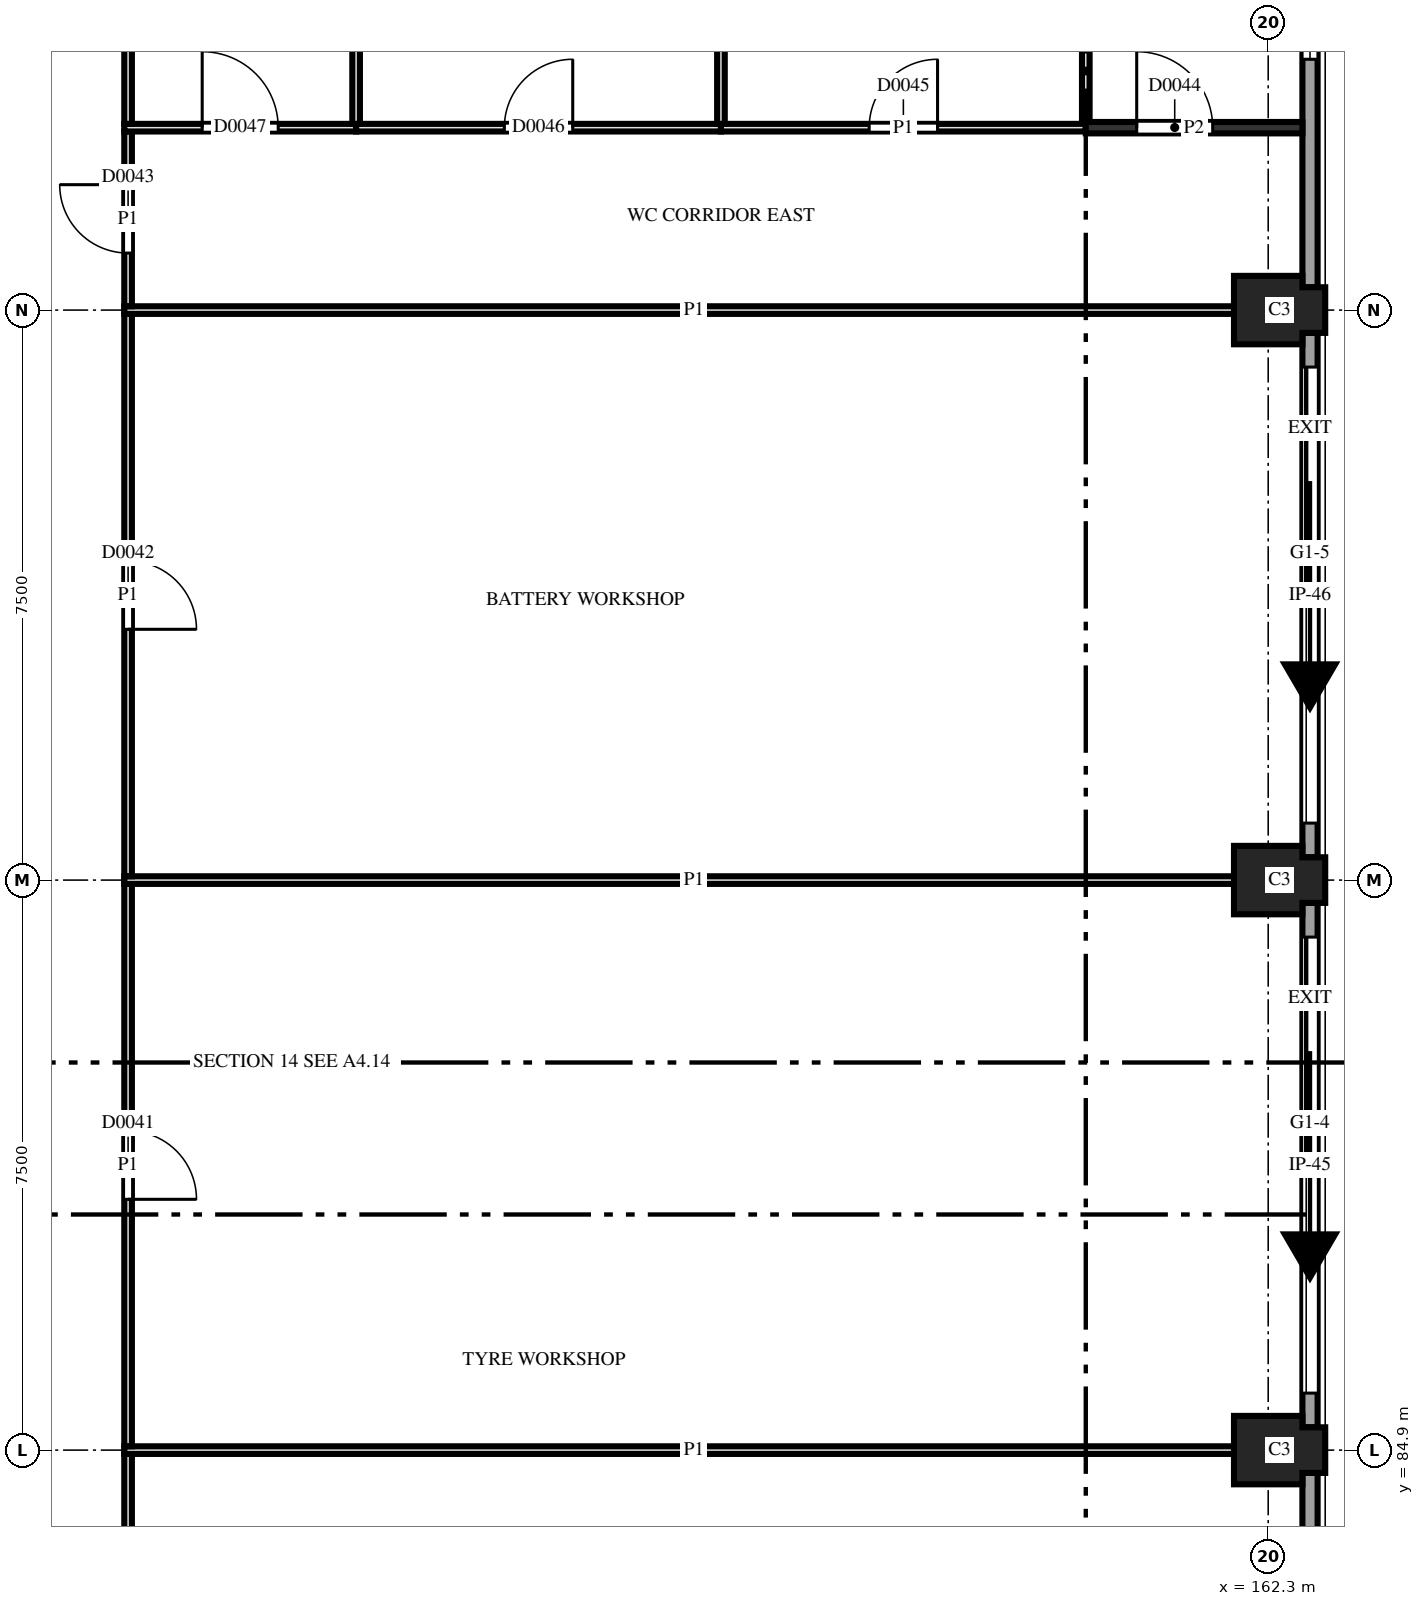
"""IFC4 building model, lengths in metres.
Left out: names, types, materials, properties, quantities, classifications, styles, units other than length and angle.
Written with IfcOpenShell. Run it as: python <this file> out.ifc"""

import sys

from ifc_helpers import new_model, si_unit, direction, frame, frame_2d, origin, place, context, subcontext, project, spatial, polyline, rectangle, outline, extrude, element, fill, save


model = new_model("IFC4")
c1 = context("Model", 3, precision=1e-05, world=origin(), true_north=direction((0.0, 1.0)))
c2 = subcontext(c1, "Body", "Model", "MODEL_VIEW")
j1 = project(units=[si_unit("LENGTHUNIT", "METRE"), si_unit("PLANEANGLEUNIT", "RADIAN")], contexts=[c1])
p1 = place(None, origin())
s1 = spatial("IfcSite", under=j1, at=p1, CompositionType="ELEMENT")
p2 = place(p1, origin())
s2 = spatial("IfcBuilding", under=s1, at=p2, CompositionType="ELEMENT")
p3 = place(p2, origin())
s3 = spatial("IfcBuildingStorey", under=s2, at=p3, CompositionType="ELEMENT", Elevation=0.0)
for number, where, z_axis, x_axis in (
    (1, (162.3, 84.9, 0.0), (0.0, 0.0, 1.0), (1.0, 0.0, 0.0)),
    (2, (162.3, 92.4, 0.0), (0.0, 0.0, 1.0), (1.0, 0.0, 0.0)),
    (3, (162.3, 99.9, 0.0), (0.0, 0.0, 1.0), (1.0, 0.0, 0.0)),
):
    element("IfcColumn", number, at=place(p3, frame(where, z_axis=z_axis, x_axis=x_axis)), inside=s3, PredefinedType="COLUMN", context=c2, shape_type="SweptSolid", body=[
        extrude(outline(polyline([(-0.45, -0.45), (0.45, -0.45), (0.45, -0.3), (0.75, -0.3), (0.75, 0.3), (0.45, 0.3), (0.45, 0.45), (-0.45, 0.45), (-0.45, -0.45)])), origin(), (0.0, 0.0, 1.0), 4.5),
    ])
p4 = place(p3, frame((162.85, 77.7, 0.0), z_axis=(0.0, 0.0, 1.0), x_axis=(0.0, 1.0, 0.0)))
e4 = element("IfcWall", 4, at=p4, inside=s3, PredefinedType="SOLIDWALL", context=c2, shape_type="SweptSolid", body=[
    extrude(outline(polyline([(0.0, 0.0), (6.9, 0.0), (6.9, 3.1), (6.002, 3.1), (6.0, 2.4), (5.681, 2.56), (5.363, 2.695), (5.044, 2.806), (4.725, 2.895), (4.406, 2.963), (4.087, 3.012), (3.769, 3.041), (3.45, 3.05), (3.131, 3.041), (2.812, 3.012), (2.494, 2.963), (2.175, 2.895), (1.856, 2.806), (1.538, 2.695), (1.219, 2.56), (0.9, 2.4), (0.898, 3.1), (0.0, 3.1), (0.0, 0.0)])), frame((0.0, 0.1, 0.0), z_axis=(0.0, -1.0, 0.0), x_axis=(1.0, 0.0, 0.0)), (0.0, 0.0, 1.0), 0.2),
])
p5 = place(p4, frame((3.0, 0.0, 2.4)))
e5 = element("IfcOpeningElement", 5, at=p5, cuts=e4, PredefinedType="OPENING", context=c2, shape_type="SweptSolid", body=[
    extrude(rectangle(XDim=0.9, YDim=0.531, at=frame_2d((0.45, 0.266))), frame((0.0, 0.11, 0.0), z_axis=(0.0, -1.0, 0.0), x_axis=(1.0, 0.0, 0.0)), (0.0, 0.0, 1.0), 0.22),
])
p6 = place(p3, frame((162.85, 85.2, 0.0), z_axis=(0.0, 0.0, 1.0), x_axis=(0.0, 1.0, 0.0)))
e6 = element("IfcWall", 6, at=p6, inside=s3, PredefinedType="SOLIDWALL", context=c2, shape_type="SweptSolid", body=[
    extrude(outline(polyline([(0.0, 0.0), (6.9, 0.0), (6.9, 3.1), (6.752, 3.1), (6.75, 2.8), (6.337, 2.859), (5.925, 2.91), (5.512, 2.953), (5.1, 2.988), (4.688, 3.015), (4.275, 3.034), (3.863, 3.046), (3.45, 3.05), (3.038, 3.046), (2.625, 3.034), (2.212, 3.015), (1.8, 2.988), (1.387, 2.953), (0.975, 2.91), (0.562, 2.859), (0.15, 2.8), (0.148, 3.1), (0.0, 3.1), (0.0, 0.0)])), frame((0.0, 0.1, 0.0), z_axis=(0.0, -1.0, 0.0), x_axis=(1.0, 0.0, 0.0)), (0.0, 0.0, 1.0), 0.2),
])
p7 = place(p6, frame((0.45, 0.0, 0.0)))
e7 = element("IfcOpeningElement", 7, at=p7, cuts=e6, PredefinedType="OPENING", context=c2, shape_type="SweptSolid", body=[
    extrude(rectangle(XDim=6.0, YDim=2.65, at=frame_2d((3.0, 1.325))), frame((0.0, 0.11, 0.0), z_axis=(0.0, -1.0, 0.0), x_axis=(1.0, 0.0, 0.0)), (0.0, 0.0, 1.0), 0.22),
])
p8 = place(p3, frame((162.85, 92.7, 0.0), z_axis=(0.0, 0.0, 1.0), x_axis=(0.0, 1.0, 0.0)))
e8 = element("IfcWall", 8, at=p8, inside=s3, PredefinedType="SOLIDWALL", context=c2, shape_type="SweptSolid", body=[
    extrude(outline(polyline([(0.0, 0.0), (6.9, 0.0), (6.9, 3.1), (6.752, 3.1), (6.75, 2.8), (6.337, 2.859), (5.925, 2.91), (5.512, 2.953), (5.1, 2.988), (4.688, 3.015), (4.275, 3.034), (3.863, 3.046), (3.45, 3.05), (3.038, 3.046), (2.625, 3.034), (2.212, 3.015), (1.8, 2.988), (1.387, 2.953), (0.975, 2.91), (0.562, 2.859), (0.15, 2.8), (0.148, 3.1), (0.0, 3.1), (0.0, 0.0)])), frame((0.0, 0.1, 0.0), z_axis=(0.0, -1.0, 0.0), x_axis=(1.0, 0.0, 0.0)), (0.0, 0.0, 1.0), 0.2),
])
p9 = place(p8, frame((0.45, 0.0, 0.0)))
e9 = element("IfcOpeningElement", 9, at=p9, cuts=e8, PredefinedType="OPENING", context=c2, shape_type="SweptSolid", body=[
    extrude(rectangle(XDim=6.0, YDim=2.65, at=frame_2d((3.0, 1.325))), frame((0.0, 0.11, 0.0), z_axis=(0.0, -1.0, 0.0), x_axis=(1.0, 0.0, 0.0)), (0.0, 0.0, 1.0), 0.22),
])
p10 = place(p3, frame((162.85, 100.2, 0.0), z_axis=(0.0, 0.0, 1.0), x_axis=(0.0, 1.0, 0.0)))
e10 = element("IfcWall", 10, at=p10, inside=s3, PredefinedType="SOLIDWALL", context=c2, shape_type="SweptSolid", body=[
    extrude(outline(polyline([(0.0, 0.0), (6.9, 0.0), (6.9, 3.1), (6.002, 3.1), (6.0, 2.4), (5.681, 2.56), (5.363, 2.695), (5.044, 2.806), (4.725, 2.895), (4.406, 2.963), (4.087, 3.012), (3.769, 3.041), (3.45, 3.05), (3.131, 3.041), (2.812, 3.012), (2.494, 2.963), (2.175, 2.895), (1.856, 2.806), (1.538, 2.695), (1.219, 2.56), (0.9, 2.4), (0.898, 3.1), (0.0, 3.1), (0.0, 0.0)])), frame((0.0, 0.1, 0.0), z_axis=(0.0, -1.0, 0.0), x_axis=(1.0, 0.0, 0.0)), (0.0, 0.0, 1.0), 0.2),
])
p11 = place(p10, frame((3.0, 0.0, 2.4)))
e11 = element("IfcOpeningElement", 11, at=p11, cuts=e10, PredefinedType="OPENING", context=c2, shape_type="SweptSolid", body=[
    extrude(rectangle(XDim=0.9, YDim=0.531, at=frame_2d((0.45, 0.266))), frame((0.0, 0.11, 0.0), z_axis=(0.0, -1.0, 0.0), x_axis=(1.0, 0.0, 0.0)), (0.0, 0.0, 1.0), 0.22),
])
p12 = place(p3, frame((147.3, 84.85, 0.0), z_axis=(0.0, 0.0, 1.0), x_axis=(0.0, -1.0, 0.0)))
e12 = element("IfcWall", 12, at=p12, inside=s3, PredefinedType="PARTITIONING", context=c2, shape_type="SweptSolid", body=[
    extrude(rectangle(XDim=22.35, YDim=0.1, at=frame_2d((11.175, 0.0))), origin(), (0.0, 0.0, 1.0), 3.68),
])
p13 = place(p12, frame((10.725, 0.0, 0.0)))
e13 = element("IfcOpeningElement", 13, at=p13, cuts=e12, PredefinedType="OPENING", context=c2, shape_type="SweptSolid", body=[
    extrude(rectangle(XDim=0.9, YDim=2.1, at=frame_2d((0.45, 1.05))), frame((0.0, 0.06, 0.0), z_axis=(0.0, -1.0, 0.0), x_axis=(1.0, 0.0, 0.0)), (0.0, 0.0, 1.0), 0.12),
])
p14 = place(p3, frame((162.24, 84.9, 0.0), z_axis=(0.0, 0.0, 1.0), x_axis=(-1.0, 0.0, 0.0)))
e14 = element("IfcWall", 14, at=p14, inside=s3, PredefinedType="PARTITIONING", context=c2, shape_type="SweptSolid", body=[
    extrude(rectangle(XDim=14.99, YDim=0.1, at=frame_2d((7.495, 0.0))), origin(), (0.0, 0.0, 1.0), 3.68),
])
p15 = place(p3, frame((147.3, 92.35, 0.0), z_axis=(0.0, 0.0, 1.0), x_axis=(0.0, -1.0, 0.0)))
e15 = element("IfcWall", 15, at=p15, inside=s3, PredefinedType="PARTITIONING", context=c2, shape_type="SweptSolid", body=[
    extrude(rectangle(XDim=7.4, YDim=0.1, at=frame_2d((3.7, 0.0))), origin(), (0.0, 0.0, 1.0), 3.68),
])
p16 = place(p15, frame((3.25, 0.0, 0.0)))
e16 = element("IfcOpeningElement", 16, at=p16, cuts=e15, PredefinedType="OPENING", context=c2, shape_type="SweptSolid", body=[
    extrude(rectangle(XDim=0.9, YDim=2.1, at=frame_2d((0.45, 1.05))), frame((0.0, 0.06, 0.0), z_axis=(0.0, -1.0, 0.0), x_axis=(1.0, 0.0, 0.0)), (0.0, 0.0, 1.0), 0.12),
])
p17 = place(p3, frame((162.24, 92.4, 0.0), z_axis=(0.0, 0.0, 1.0), x_axis=(-1.0, 0.0, 0.0)))
e17 = element("IfcWall", 17, at=p17, inside=s3, PredefinedType="PARTITIONING", context=c2, shape_type="SweptSolid", body=[
    extrude(rectangle(XDim=14.99, YDim=0.1, at=frame_2d((7.495, 0.0))), origin(), (0.0, 0.0, 1.0), 3.68),
])
p18 = place(p3, frame((147.3, 99.85, 0.0), z_axis=(0.0, 0.0, 1.0), x_axis=(0.0, -1.0, 0.0)))
e18 = element("IfcWall", 18, at=p18, inside=s3, PredefinedType="PARTITIONING", context=c2, shape_type="SweptSolid", body=[
    extrude(rectangle(XDim=7.4, YDim=0.1, at=frame_2d((3.7, 0.0))), origin(), (0.0, 0.0, 1.0), 3.68),
])
p19 = place(p18, frame((3.25, 0.0, 0.0)))
e19 = element("IfcOpeningElement", 19, at=p19, cuts=e18, PredefinedType="OPENING", context=c2, shape_type="SweptSolid", body=[
    extrude(rectangle(XDim=0.9, YDim=2.1, at=frame_2d((0.45, 1.05))), frame((0.0, 0.06, 0.0), z_axis=(0.0, -1.0, 0.0), x_axis=(1.0, 0.0, 0.0)), (0.0, 0.0, 1.0), 0.12),
])
p20 = place(p3, frame((162.24, 99.9, 0.0), z_axis=(0.0, 0.0, 1.0), x_axis=(-1.0, 0.0, 0.0)))
e20 = element("IfcWall", 20, at=p20, inside=s3, PredefinedType="PARTITIONING", context=c2, shape_type="SweptSolid", body=[
    extrude(rectangle(XDim=14.99, YDim=0.1, at=frame_2d((7.495, 0.0))), origin(), (0.0, 0.0, 1.0), 3.68),
])
p21 = place(p3, frame((147.3, 102.25, 0.0), z_axis=(0.0, 0.0, 1.0), x_axis=(0.0, -1.0, 0.0)))
e21 = element("IfcWall", 21, at=p21, inside=s3, PredefinedType="PARTITIONING", context=c2, shape_type="SweptSolid", body=[
    extrude(rectangle(XDim=2.3, YDim=0.1, at=frame_2d((1.15, 0.0))), origin(), (0.0, 0.0, 1.0), 3.68),
])
p22 = place(p21, frame((0.7, 0.0, 0.0)))
e22 = element("IfcOpeningElement", 22, at=p22, cuts=e21, PredefinedType="OPENING", context=c2, shape_type="SweptSolid", body=[
    extrude(rectangle(XDim=0.9, YDim=2.1, at=frame_2d((0.45, 1.05))), frame((0.0, 0.06, 0.0), z_axis=(0.0, -1.0, 0.0), x_axis=(1.0, 0.0, 0.0)), (0.0, 0.0, 1.0), 0.12),
])
p23 = place(p3, frame((150.3, 102.3, 0.0), z_axis=(0.0, 0.0, 1.0), x_axis=(-1.0, 0.0, 0.0)))
e23 = element("IfcWall", 23, at=p23, inside=s3, PredefinedType="PARTITIONING", context=c2, shape_type="SweptSolid", body=[
    extrude(rectangle(XDim=3.05, YDim=0.1, at=frame_2d((1.525, 0.0))), origin(), (0.0, 0.0, 1.0), 3.68),
])
p24 = place(p23, frame((1.025, 0.0, 0.0)))
e24 = element("IfcOpeningElement", 24, at=p24, cuts=e23, PredefinedType="OPENING", context=c2, shape_type="SweptSolid", body=[
    extrude(rectangle(XDim=1.0, YDim=2.1, at=frame_2d((0.5, 1.05))), frame((0.0, 0.06, 0.0), z_axis=(0.0, -1.0, 0.0), x_axis=(1.0, 0.0, 0.0)), (0.0, 0.0, 1.0), 0.12),
])
p25 = place(p3, frame((155.1, 102.3, 0.0), z_axis=(0.0, 0.0, 1.0), x_axis=(-1.0, 0.0, 0.0)))
e25 = element("IfcWall", 25, at=p25, inside=s3, PredefinedType="PARTITIONING", context=c2, shape_type="SweptSolid", body=[
    extrude(rectangle(XDim=4.8, YDim=0.1, at=frame_2d((2.4, 0.0))), origin(), (0.0, 0.0, 1.0), 3.68),
])
p26 = place(p25, frame((1.95, 0.0, 0.0)))
e26 = element("IfcOpeningElement", 26, at=p26, cuts=e25, PredefinedType="OPENING", context=c2, shape_type="SweptSolid", body=[
    extrude(rectangle(XDim=0.9, YDim=2.1, at=frame_2d((0.45, 1.05))), frame((0.0, 0.06, 0.0), z_axis=(0.0, -1.0, 0.0), x_axis=(1.0, 0.0, 0.0)), (0.0, 0.0, 1.0), 0.12),
])
p27 = place(p3, frame((159.9, 102.3, 0.0), z_axis=(0.0, 0.0, 1.0), x_axis=(-1.0, 0.0, 0.0)))
e27 = element("IfcWall", 27, at=p27, inside=s3, PredefinedType="PARTITIONING", context=c2, shape_type="SweptSolid", body=[
    extrude(rectangle(XDim=4.8, YDim=0.1, at=frame_2d((2.4, 0.0))), origin(), (0.0, 0.0, 1.0), 3.68),
])
p28 = place(p27, frame((1.95, 0.0, 0.0)))
e28 = element("IfcOpeningElement", 28, at=p28, cuts=e27, PredefinedType="OPENING", context=c2, shape_type="SweptSolid", body=[
    extrude(rectangle(XDim=0.9, YDim=2.1, at=frame_2d((0.45, 1.05))), frame((0.0, 0.06, 0.0), z_axis=(0.0, -1.0, 0.0), x_axis=(1.0, 0.0, 0.0)), (0.0, 0.0, 1.0), 0.12),
])
p29 = place(p3, frame((162.75, 102.3, 0.0), z_axis=(0.0, 0.0, 1.0), x_axis=(-1.0, 0.0, 0.0)))
e29 = element("IfcWall", 29, at=p29, inside=s3, PredefinedType="PARTITIONING", context=c2, shape_type="SweptSolid", body=[
    extrude(rectangle(XDim=2.85, YDim=0.15, at=frame_2d((1.425, 0.0))), origin(), (0.0, 0.0, 1.0), 3.68),
])
p30 = place(p29, frame((1.18, 0.0, 0.0)))
e30 = element("IfcOpeningElement", 30, at=p30, cuts=e29, PredefinedType="OPENING", context=c2, shape_type="SweptSolid", body=[
    extrude(rectangle(XDim=1.0, YDim=2.1, at=frame_2d((0.5, 1.05))), frame((0.0, 0.085, 0.0), z_axis=(0.0, -1.0, 0.0), x_axis=(1.0, 0.0, 0.0)), (0.0, 0.0, 1.0), 0.17),
])
for number, where, z_axis, x_axis in (
    (31, (147.3, 107.35, 0.0), (0.0, 0.0, 1.0), (0.0, -1.0, 0.0)),
    (32, (150.3, 107.35, 0.0), (0.0, 0.0, 1.0), (0.0, -1.0, 0.0)),
):
    element("IfcWall", number, at=place(p3, frame(where, z_axis=z_axis, x_axis=x_axis)), inside=s3, PredefinedType="PARTITIONING", context=c2, shape_type="SweptSolid", body=[
        extrude(rectangle(XDim=5.0, YDim=0.1, at=frame_2d((2.5, 0.0))), origin(), (0.0, 0.0, 1.0), 3.68),
    ])
p31 = place(p3, frame((155.1, 107.3, 0.0), z_axis=(0.0, 0.0, 1.0), x_axis=(0.0, -1.0, 0.0)))
e33 = element("IfcWall", 33, at=p31, inside=s3, PredefinedType="PARTITIONING", context=c2, shape_type="SweptSolid", body=[
    extrude(rectangle(XDim=4.95, YDim=0.1, at=frame_2d((2.475, 0.0))), origin(), (0.0, 0.0, 1.0), 3.68),
])
p32 = place(p3, frame((159.9, 107.35, 0.0), z_axis=(0.0, 0.0, 1.0), x_axis=(0.0, -1.0, 0.0)))
e34 = element("IfcWall", 34, at=p32, inside=s3, PredefinedType="PARTITIONING", context=c2, shape_type="SweptSolid", body=[
    extrude(rectangle(XDim=4.975, YDim=0.1, at=frame_2d((2.488, 0.0))), origin(), (0.0, 0.0, 1.0), 3.68),
])
p33 = place(p7, frame((6.0, 0.0, 0.0), z_axis=(0.0, 0.0, 1.0), x_axis=(-1.0, 0.0, 0.0)))
e35 = element("IfcDoor", 35, at=p33, inside=s3, OperationType="SINGLE_SWING_LEFT", PredefinedType="GATE", context=c2, shape_type="SweptSolid", body=[
    extrude(rectangle(XDim=6.0, YDim=2.65, at=frame_2d((3.0, 1.325))), frame((0.0, 0.025, 0.0), z_axis=(0.0, -1.0, 0.0), x_axis=(1.0, 0.0, 0.0)), (0.0, 0.0, 1.0), 0.05),
])
fill(e7, e35)
p34 = place(p9, frame((6.0, 0.0, 0.0), z_axis=(0.0, 0.0, 1.0), x_axis=(-1.0, 0.0, 0.0)))
e36 = element("IfcDoor", 36, at=p34, inside=s3, OperationType="SINGLE_SWING_LEFT", PredefinedType="GATE", context=c2, shape_type="SweptSolid", body=[
    extrude(rectangle(XDim=6.0, YDim=2.65, at=frame_2d((3.0, 1.325))), frame((0.0, 0.025, 0.0), z_axis=(0.0, -1.0, 0.0), x_axis=(1.0, 0.0, 0.0)), (0.0, 0.0, 1.0), 0.05),
])
fill(e9, e36)
p35 = place(p11, origin())
e37 = element("IfcWindow", 37, at=p35, inside=s3, PartitioningType="SINGLE_PANEL", PredefinedType="WINDOW", context=c2, shape_type="SweptSolid", body=[
    extrude(rectangle(XDim=0.9, YDim=0.531, at=frame_2d((0.45, 0.266))), frame((0.0, 0.03, 0.0), z_axis=(0.0, -1.0, 0.0), x_axis=(1.0, 0.0, 0.0)), (0.0, 0.0, 1.0), 0.06),
])
fill(e11, e37)
p36 = place(p16, origin())
e38 = element("IfcDoor", 38, at=p36, inside=s3, OperationType="SINGLE_SWING_LEFT", PredefinedType="DOOR", context=c2, shape_type="SweptSolid", body=[
    extrude(rectangle(XDim=0.9, YDim=2.1, at=frame_2d((0.45, 1.05))), frame((0.0, 0.025, 0.0), z_axis=(0.0, -1.0, 0.0), x_axis=(1.0, 0.0, 0.0)), (0.0, 0.0, 1.0), 0.05),
])
fill(e16, e38)
p37 = place(p19, origin())
e39 = element("IfcDoor", 39, at=p37, inside=s3, OperationType="SINGLE_SWING_LEFT", PredefinedType="DOOR", context=c2, shape_type="SweptSolid", body=[
    extrude(rectangle(XDim=0.9, YDim=2.1, at=frame_2d((0.45, 1.05))), frame((0.0, 0.025, 0.0), z_axis=(0.0, -1.0, 0.0), x_axis=(1.0, 0.0, 0.0)), (0.0, 0.0, 1.0), 0.05),
])
fill(e19, e39)
p38 = place(p22, origin())
e40 = element("IfcDoor", 40, at=p38, inside=s3, OperationType="SINGLE_SWING_LEFT", PredefinedType="DOOR", context=c2, shape_type="SweptSolid", body=[
    extrude(rectangle(XDim=0.9, YDim=2.1, at=frame_2d((0.45, 1.05))), frame((0.0, 0.025, 0.0), z_axis=(0.0, -1.0, 0.0), x_axis=(1.0, 0.0, 0.0)), (0.0, 0.0, 1.0), 0.05),
])
fill(e22, e40)
p39 = place(p30, origin())
e41 = element("IfcDoor", 41, at=p39, inside=s3, OperationType="SINGLE_SWING_RIGHT", PredefinedType="DOOR", context=c2, shape_type="SweptSolid", body=[
    extrude(rectangle(XDim=1.0, YDim=2.1, at=frame_2d((0.5, 1.05))), frame((0.0, 0.025, 0.0), z_axis=(0.0, -1.0, 0.0), x_axis=(1.0, 0.0, 0.0)), (0.0, 0.0, 1.0), 0.05),
])
fill(e30, e41)
p40 = place(p28, origin())
e42 = element("IfcDoor", 42, at=p40, inside=s3, OperationType="SINGLE_SWING_LEFT", PredefinedType="DOOR", context=c2, shape_type="SweptSolid", body=[
    extrude(rectangle(XDim=0.9, YDim=2.1, at=frame_2d((0.45, 1.05))), frame((0.0, 0.025, 0.0), z_axis=(0.0, -1.0, 0.0), x_axis=(1.0, 0.0, 0.0)), (0.0, 0.0, 1.0), 0.05),
])
fill(e28, e42)
p41 = place(p26, origin())
e43 = element("IfcDoor", 43, at=p41, inside=s3, OperationType="SINGLE_SWING_LEFT", PredefinedType="DOOR", context=c2, shape_type="SweptSolid", body=[
    extrude(rectangle(XDim=0.9, YDim=2.1, at=frame_2d((0.45, 1.05))), frame((0.0, 0.025, 0.0), z_axis=(0.0, -1.0, 0.0), x_axis=(1.0, 0.0, 0.0)), (0.0, 0.0, 1.0), 0.05),
])
fill(e26, e43)
p42 = place(p24, origin())
e44 = element("IfcDoor", 44, at=p42, inside=s3, OperationType="SINGLE_SWING_RIGHT", PredefinedType="DOOR", context=c2, shape_type="SweptSolid", body=[
    extrude(rectangle(XDim=1.0, YDim=2.1, at=frame_2d((0.5, 1.05))), frame((0.0, 0.025, 0.0), z_axis=(0.0, -1.0, 0.0), x_axis=(1.0, 0.0, 0.0)), (0.0, 0.0, 1.0), 0.05),
])
fill(e24, e44)
save(model, sys.argv[1])
